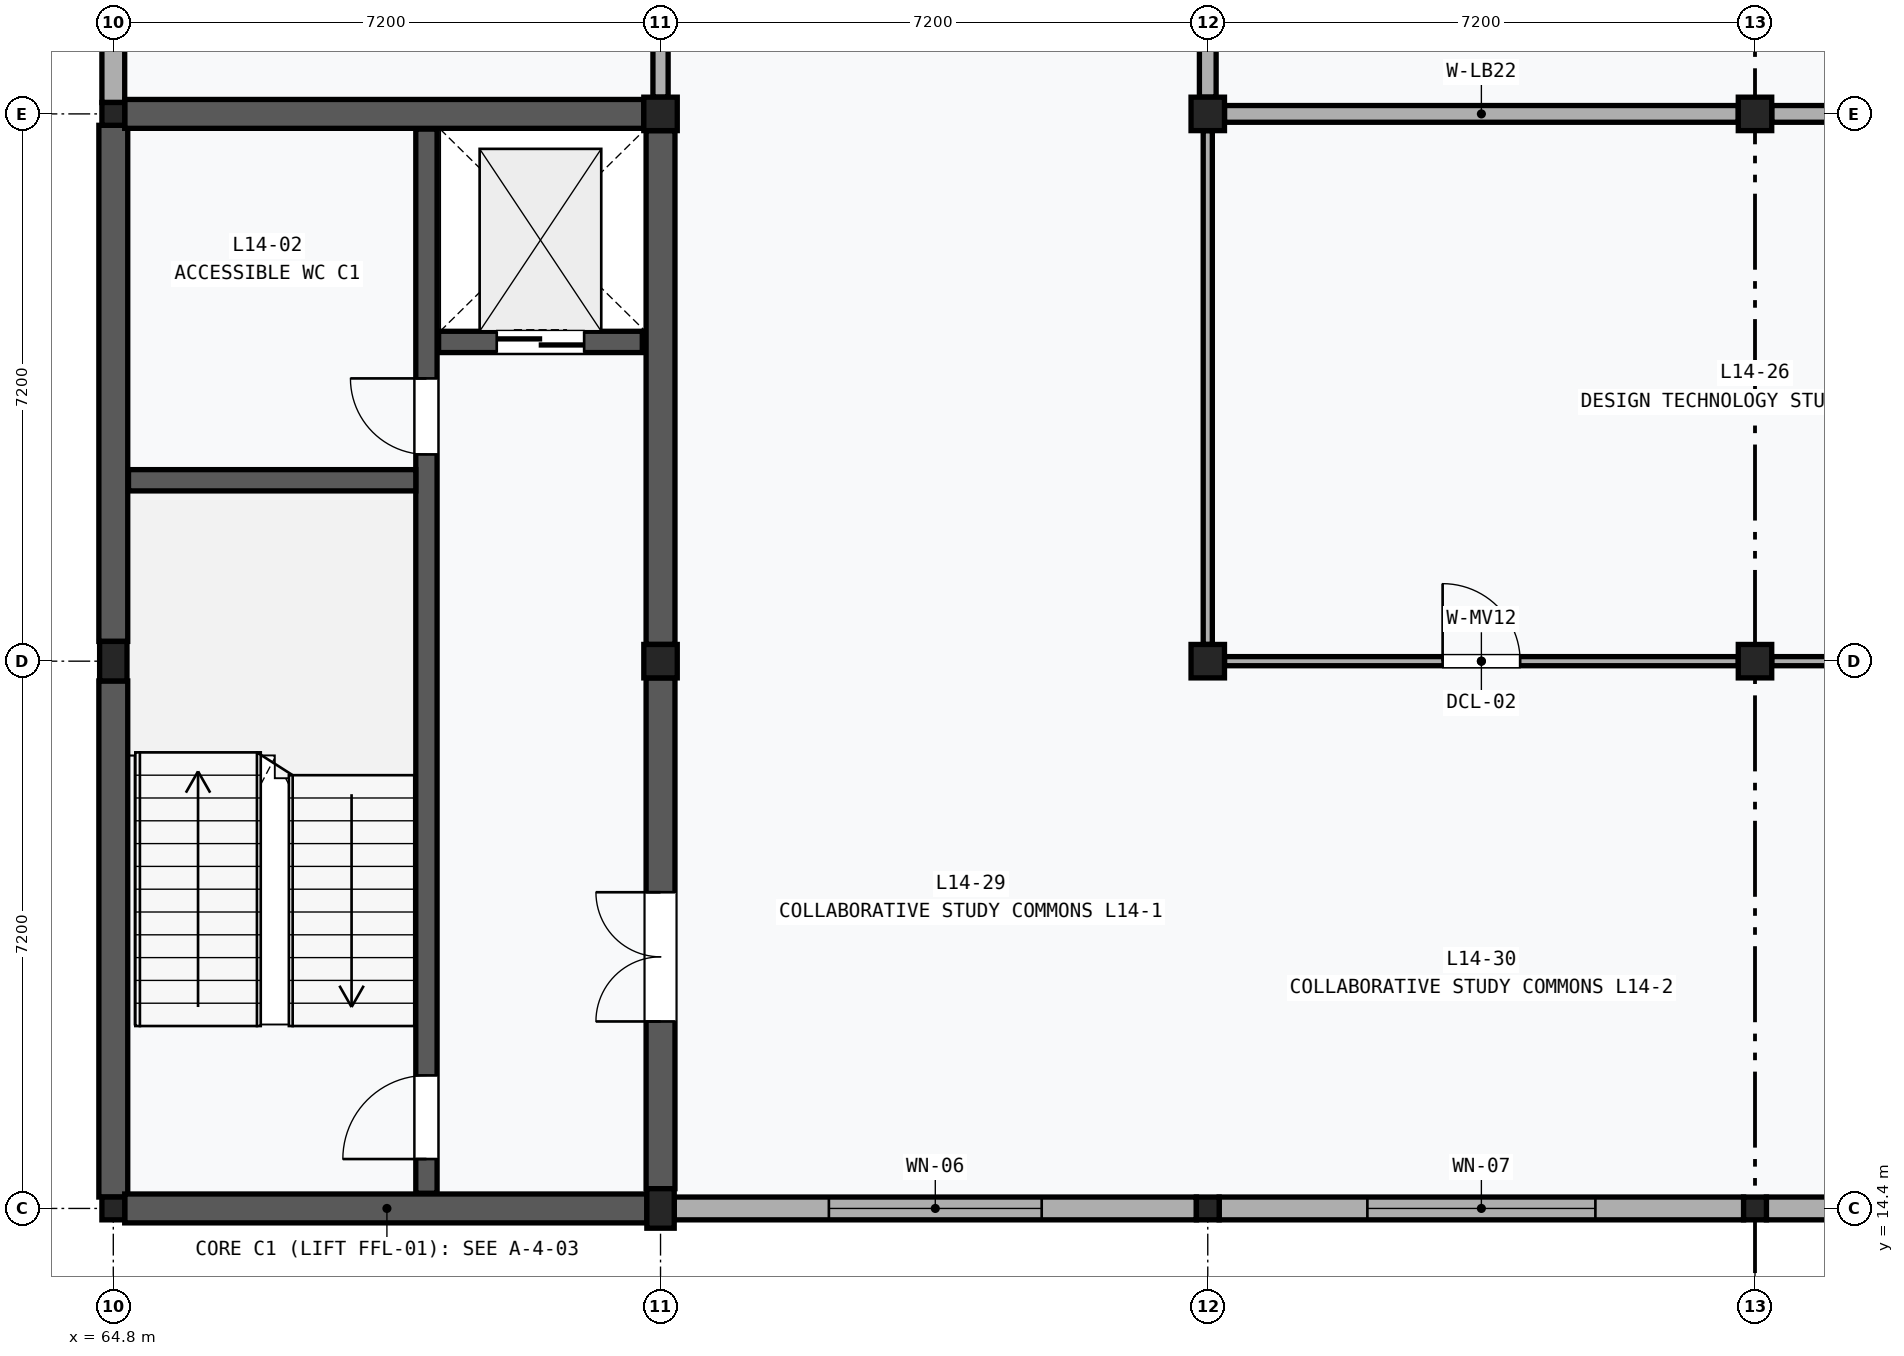
"""IFC4 building model, lengths in metres.
Left out: names, types, materials, properties, quantities, classifications, styles, units other than length and angle.
Written with IfcOpenShell. Run it as: python <this file> out.ifc"""

import sys

from ifc_helpers import new_model, si_unit, direction, frame, frame_2d, origin, origin_2d, place, context, subcontext, project, spatial, rectangle, extrude, element, fill, save


model = new_model("IFC4")
c1 = context("Model", 3, precision=1e-05, world=origin(), true_north=direction((0.0, 1.0)))
c2 = subcontext(c1, "Body", "Model", "MODEL_VIEW")
j1 = project(units=[si_unit("LENGTHUNIT", "METRE"), si_unit("PLANEANGLEUNIT", "RADIAN")], contexts=[c1])
p1 = place(None, origin())
s1 = spatial("IfcSite", under=j1, at=p1, CompositionType="ELEMENT")
p2 = place(p1, origin())
s2 = spatial("IfcBuilding", under=s1, at=p2, CompositionType="ELEMENT")
p3 = place(p2, frame((0.0, 0.0, 59.0)))
s3 = spatial("IfcBuildingStorey", under=s2, at=p3, CompositionType="ELEMENT", Elevation=59.0)
p4 = place(p3, frame((64.8, 14.4, 0.0), z_axis=(0.0, 0.0, 1.0), x_axis=(1.0, 0.0, 0.0)))
e1 = element("IfcColumn", 1, at=p4, inside=s3, PredefinedType="COLUMN", context=c2, shape_type="SweptSolid", body=[
    extrude(rectangle(XDim=0.3, YDim=0.3, at=origin_2d()), origin(), (0.0, 0.0, 1.0), 4.0),
])
p5 = place(p3, frame((64.8, 21.6, 0.0), z_axis=(0.0, 0.0, 1.0), x_axis=(1.0, 0.0, 0.0)))
e2 = element("IfcColumn", 2, at=p5, inside=s3, PredefinedType="PILASTER", context=c2, shape_type="SweptSolid", body=[
    extrude(rectangle(XDim=0.36, YDim=0.52, at=origin_2d()), origin(), (0.0, 0.0, 1.0), 4.0),
])
p6 = place(p3, frame((64.8, 28.8, 0.0), z_axis=(0.0, 0.0, 1.0), x_axis=(1.0, 0.0, 0.0)))
e3 = element("IfcColumn", 3, at=p6, inside=s3, PredefinedType="COLUMN", context=c2, shape_type="SweptSolid", body=[
    extrude(rectangle(XDim=0.3, YDim=0.3, at=origin_2d()), origin(), (0.0, 0.0, 1.0), 4.0),
])
p7 = place(p3, frame((72.0, 14.4, 0.0), z_axis=(0.0, 0.0, 1.0), x_axis=(1.0, 0.0, 0.0)))
e4 = element("IfcColumn", 4, at=p7, inside=s3, PredefinedType="PILASTER", context=c2, shape_type="SweptSolid", body=[
    extrude(rectangle(XDim=0.36, YDim=0.52, at=origin_2d()), origin(), (0.0, 0.0, 1.0), 4.0),
])
for number, where, z_axis, x_axis in (
    (5, (72.0, 21.6, 0.0), (0.0, 0.0, 1.0), (1.0, 0.0, 0.0)),
    (6, (72.0, 28.8, 0.0), (0.0, 0.0, 1.0), (1.0, 0.0, 0.0)),
):
    element("IfcColumn", number, at=place(p3, frame(where, z_axis=z_axis, x_axis=x_axis)), inside=s3, PredefinedType="COLUMN", context=c2, shape_type="SweptSolid", body=[
        extrude(rectangle(XDim=0.44, YDim=0.44, at=origin_2d()), origin(), (0.0, 0.0, 1.0), 4.0),
    ])
p8 = place(p3, frame((79.2, 14.4, 0.0), z_axis=(0.0, 0.0, 1.0), x_axis=(1.0, 0.0, 0.0)))
e7 = element("IfcColumn", 7, at=p8, inside=s3, PredefinedType="COLUMN", context=c2, shape_type="SweptSolid", body=[
    extrude(rectangle(XDim=0.3, YDim=0.3, at=origin_2d()), origin(), (0.0, 0.0, 1.0), 4.0),
])
for number, where, z_axis, x_axis in (
    (8, (79.2, 21.6, 0.0), (0.0, 0.0, 1.0), (1.0, 0.0, 0.0)),
    (9, (79.2, 28.8, 0.0), (0.0, 0.0, 1.0), (1.0, 0.0, 0.0)),
):
    element("IfcColumn", number, at=place(p3, frame(where, z_axis=z_axis, x_axis=x_axis)), inside=s3, PredefinedType="COLUMN", context=c2, shape_type="SweptSolid", body=[
        extrude(rectangle(XDim=0.44, YDim=0.44, at=origin_2d()), origin(), (0.0, 0.0, 1.0), 4.0),
    ])
p9 = place(p3, frame((86.4, 14.4, 0.0), z_axis=(0.0, 0.0, 1.0), x_axis=(1.0, 0.0, 0.0)))
e10 = element("IfcColumn", 10, at=p9, inside=s3, PredefinedType="COLUMN", context=c2, shape_type="SweptSolid", body=[
    extrude(rectangle(XDim=0.3, YDim=0.3, at=origin_2d()), origin(), (0.0, 0.0, 1.0), 4.0),
])
for number, where, z_axis, x_axis in (
    (11, (86.4, 21.6, 0.0), (0.0, 0.0, 1.0), (1.0, 0.0, 0.0)),
    (12, (86.4, 28.8, 0.0), (0.0, 0.0, 1.0), (1.0, 0.0, 0.0)),
):
    element("IfcColumn", number, at=place(p3, frame(where, z_axis=z_axis, x_axis=x_axis)), inside=s3, PredefinedType="COLUMN", context=c2, shape_type="SweptSolid", body=[
        extrude(rectangle(XDim=0.44, YDim=0.44, at=origin_2d()), origin(), (0.0, 0.0, 1.0), 4.0),
    ])
p10 = place(p3, frame((64.8, 28.95, 0.0), z_axis=(0.0, 0.0, 1.0), x_axis=(0.0, 1.0, 0.0)))
e13 = element("IfcWall", 13, at=p10, inside=s3, PredefinedType="SOLIDWALL", context=c2, shape_type="SweptSolid", body=[
    extrude(rectangle(XDim=6.9, YDim=0.3, at=frame_2d((3.45, 0.0))), origin(), (0.0, 0.0, 1.0), 3.19),
])
p11 = place(p3, frame((72.18, 14.4, 0.0), z_axis=(0.0, 0.0, 1.0), x_axis=(1.0, 0.0, 0.0)))
e14 = element("IfcWall", 14, at=p11, inside=s3, PredefinedType="SOLIDWALL", context=c2, shape_type="SweptSolid", body=[
    extrude(rectangle(XDim=6.87, YDim=0.3, at=frame_2d((3.435, 0.0))), origin(), (0.0, 0.0, 1.0), 3.19),
])
p12 = place(p11, frame((2.035, 0.0, 0.9)))
e15 = element("IfcOpeningElement", 15, at=p12, cuts=e14, PredefinedType="OPENING", context=c2, shape_type="SweptSolid", body=[
    extrude(rectangle(XDim=2.8, YDim=1.8, at=frame_2d((1.4, 0.9))), frame((0.0, 0.162, 0.0), z_axis=(0.0, -1.0, 0.0), x_axis=(1.0, 0.0, 0.0)), (0.0, 0.0, 1.0), 0.324),
])
p13 = place(p3, frame((79.35, 14.4, 0.0), z_axis=(0.0, 0.0, 1.0), x_axis=(1.0, 0.0, 0.0)))
e16 = element("IfcWall", 16, at=p13, inside=s3, PredefinedType="SOLIDWALL", context=c2, shape_type="SweptSolid", body=[
    extrude(rectangle(XDim=6.9, YDim=0.3, at=frame_2d((3.45, 0.0))), origin(), (0.0, 0.0, 1.0), 3.19),
])
p14 = place(p13, frame((1.95, 0.0, 0.9)))
e17 = element("IfcOpeningElement", 17, at=p14, cuts=e16, PredefinedType="OPENING", context=c2, shape_type="SweptSolid", body=[
    extrude(rectangle(XDim=3.0, YDim=1.8, at=frame_2d((1.5, 0.9))), frame((0.0, 0.162, 0.0), z_axis=(0.0, -1.0, 0.0), x_axis=(1.0, 0.0, 0.0)), (0.0, 0.0, 1.0), 0.324),
])
p15 = place(p3, frame((86.55, 14.4, 0.0), z_axis=(0.0, 0.0, 1.0), x_axis=(1.0, 0.0, 0.0)))
e18 = element("IfcWall", 18, at=p15, inside=s3, PredefinedType="SOLIDWALL", context=c2, shape_type="SweptSolid", body=[
    extrude(rectangle(XDim=6.9, YDim=0.3, at=frame_2d((3.45, 0.0))), origin(), (0.0, 0.0, 1.0), 3.19),
])
p16 = place(p15, frame((1.85, 0.0, 0.9)))
e19 = element("IfcOpeningElement", 19, at=p16, cuts=e18, PredefinedType="OPENING", context=c2, shape_type="SweptSolid", body=[
    extrude(rectangle(XDim=3.2, YDim=1.8, at=frame_2d((1.6, 0.9))), frame((0.0, 0.162, 0.0), z_axis=(0.0, -1.0, 0.0), x_axis=(1.0, 0.0, 0.0)), (0.0, 0.0, 1.0), 0.324),
])
p17 = place(p3, frame((64.8, 14.55, 0.0), z_axis=(0.0, 0.0, 1.0), x_axis=(0.0, 1.0, 0.0)))
e20 = element("IfcWall", 20, at=p17, inside=s3, PredefinedType="SHEAR", context=c2, shape_type="SweptSolid", body=[
    extrude(rectangle(XDim=6.79, YDim=0.38, at=frame_2d((3.395, 0.0))), origin(), (0.0, 0.0, 1.0), 3.19),
])
p18 = place(p3, frame((64.8, 21.86, 0.0), z_axis=(0.0, 0.0, 1.0), x_axis=(0.0, 1.0, 0.0)))
e21 = element("IfcWall", 21, at=p18, inside=s3, PredefinedType="SHEAR", context=c2, shape_type="SweptSolid", body=[
    extrude(rectangle(XDim=6.79, YDim=0.38, at=frame_2d((3.395, 0.0))), origin(), (0.0, 0.0, 1.0), 3.19),
])
p19 = place(p3, frame((72.0, 14.66, 0.0), z_axis=(0.0, 0.0, 1.0), x_axis=(0.0, 1.0, 0.0)))
e22 = element("IfcWall", 22, at=p19, inside=s3, PredefinedType="SHEAR", context=c2, shape_type="SweptSolid", body=[
    extrude(rectangle(XDim=6.72, YDim=0.38, at=frame_2d((3.36, 0.0))), origin(), (0.0, 0.0, 1.0), 3.11),
])
p20 = place(p19, frame((2.2, 0.0, 0.0)))
e23 = element("IfcOpeningElement", 23, at=p20, cuts=e22, PredefinedType="OPENING", context=c2, shape_type="SweptSolid", body=[
    extrude(rectangle(XDim=1.7, YDim=2.25, at=frame_2d((0.85, 1.125))), frame((0.0, 0.202, 0.0), z_axis=(0.0, -1.0, 0.0), x_axis=(1.0, 0.0, 0.0)), (0.0, 0.0, 1.0), 0.404),
])
p21 = place(p3, frame((72.0, 21.82, 0.0), z_axis=(0.0, 0.0, 1.0), x_axis=(0.0, 1.0, 0.0)))
e24 = element("IfcWall", 24, at=p21, inside=s3, PredefinedType="SHEAR", context=c2, shape_type="SweptSolid", body=[
    extrude(rectangle(XDim=6.76, YDim=0.38, at=frame_2d((3.38, 0.0))), origin(), (0.0, 0.0, 1.0), 3.11),
])
p22 = place(p3, frame((64.95, 14.4, 0.0), z_axis=(0.0, 0.0, 1.0), x_axis=(1.0, 0.0, 0.0)))
e25 = element("IfcWall", 25, at=p22, inside=s3, PredefinedType="SHEAR", context=c2, shape_type="SweptSolid", body=[
    extrude(rectangle(XDim=6.87, YDim=0.38, at=frame_2d((3.435, 0.0))), origin(), (0.0, 0.0, 1.0), 3.19),
])
p23 = place(p3, frame((64.95, 28.8, 0.0), z_axis=(0.0, 0.0, 1.0), x_axis=(1.0, 0.0, 0.0)))
e26 = element("IfcWall", 26, at=p23, inside=s3, PredefinedType="SHEAR", context=c2, shape_type="SweptSolid", body=[
    extrude(rectangle(XDim=6.83, YDim=0.38, at=frame_2d((3.415, 0.0))), origin(), (0.0, 0.0, 1.0), 3.11),
])
p24 = place(p3, frame((68.92, 14.6, 0.0), z_axis=(0.0, 0.0, 1.0), x_axis=(0.0, 1.0, 0.0)))
e27 = element("IfcWall", 27, at=p24, inside=s3, PredefinedType="SHEAR", context=c2, shape_type="SweptSolid", body=[
    extrude(rectangle(XDim=14.0, YDim=0.28, at=frame_2d((7.0, 0.0))), origin(), (0.0, 0.0, 1.0), 3.76),
])
p25 = place(p24, frame((0.45, 0.0, 0.0)))
e28 = element("IfcOpeningElement", 28, at=p25, cuts=e27, PredefinedType="OPENING", context=c2, shape_type="SweptSolid", body=[
    extrude(rectangle(XDim=1.1, YDim=2.15, at=frame_2d((0.55, 1.075))), frame((0.0, 0.152, 0.0), z_axis=(0.0, -1.0, 0.0), x_axis=(1.0, 0.0, 0.0)), (0.0, 0.0, 1.0), 0.304),
])
p26 = place(p24, frame((9.72, 0.0, 0.0)))
e29 = element("IfcOpeningElement", 29, at=p26, cuts=e27, PredefinedType="OPENING", context=c2, shape_type="SweptSolid", body=[
    extrude(rectangle(XDim=1.0, YDim=2.15, at=frame_2d((0.5, 1.075))), frame((0.0, 0.152, 0.0), z_axis=(0.0, -1.0, 0.0), x_axis=(1.0, 0.0, 0.0)), (0.0, 0.0, 1.0), 0.304),
])
p27 = place(p3, frame((65.0, 23.98, 0.0), z_axis=(0.0, 0.0, 1.0), x_axis=(1.0, 0.0, 0.0)))
e30 = element("IfcWall", 30, at=p27, inside=s3, PredefinedType="SHEAR", context=c2, shape_type="SweptSolid", body=[
    extrude(rectangle(XDim=3.78, YDim=0.28, at=frame_2d((1.89, 0.0))), origin(), (0.0, 0.0, 1.0), 3.76),
])
p28 = place(p3, frame((69.08, 25.8, 0.0), z_axis=(0.0, 0.0, 1.0), x_axis=(1.0, 0.0, 0.0)))
e31 = element("IfcWall", 31, at=p28, inside=s3, PredefinedType="SHEAR", context=c2, shape_type="SweptSolid", body=[
    extrude(rectangle(XDim=2.68, YDim=0.28, at=frame_2d((1.34, 0.0))), origin(), (0.0, 0.0, 1.0), 3.76),
])
p29 = place(p28, frame((0.765, 0.0, 0.0)))
e32 = element("IfcOpeningElement", 32, at=p29, cuts=e31, PredefinedType="OPENING", context=c2, shape_type="SweptSolid", body=[
    extrude(rectangle(XDim=1.15, YDim=2.2, at=frame_2d((0.575, 1.1))), frame((0.0, 0.152, 0.0), z_axis=(0.0, -1.0, 0.0), x_axis=(1.0, 0.0, 0.0)), (0.0, 0.0, 1.0), 0.304),
])
p30 = place(p3, frame((79.42, 28.8, 0.0), z_axis=(0.0, 0.0, 1.0), x_axis=(1.0, 0.0, 0.0)))
e33 = element("IfcWall", 33, at=p30, inside=s3, PredefinedType="PARTITIONING", context=c2, shape_type="SweptSolid", body=[
    extrude(rectangle(XDim=6.76, YDim=0.22, at=frame_2d((3.38, 0.0))), origin(), (0.0, 0.0, 1.0), 3.11),
])
p31 = place(p3, frame((79.2, 29.02, 0.0), z_axis=(0.0, 0.0, 1.0), x_axis=(0.0, 1.0, 0.0)))
e34 = element("IfcWall", 34, at=p31, inside=s3, PredefinedType="PARTITIONING", context=c2, shape_type="SweptSolid", body=[
    extrude(rectangle(XDim=6.76, YDim=0.22, at=frame_2d((3.38, 0.0))), origin(), (0.0, 0.0, 1.0), 3.11),
])
p32 = place(p31, frame((2.8, 0.0, 0.0)))
e35 = element("IfcOpeningElement", 35, at=p32, cuts=e34, PredefinedType="OPENING", context=c2, shape_type="SweptSolid", body=[
    extrude(rectangle(XDim=1.16, YDim=2.22, at=frame_2d((0.58, 1.11))), frame((0.0, 0.122, 0.0), z_axis=(0.0, -1.0, 0.0), x_axis=(1.0, 0.0, 0.0)), (0.0, 0.0, 1.0), 0.244),
])
p33 = place(p3, frame((86.62, 28.8, 0.0), z_axis=(0.0, 0.0, 1.0), x_axis=(1.0, 0.0, 0.0)))
e36 = element("IfcWall", 36, at=p33, inside=s3, PredefinedType="PARTITIONING", context=c2, shape_type="SweptSolid", body=[
    extrude(rectangle(XDim=6.76, YDim=0.22, at=frame_2d((3.38, 0.0))), origin(), (0.0, 0.0, 1.0), 3.11),
])
p34 = place(p3, frame((72.0, 29.02, 0.0), z_axis=(0.0, 0.0, 1.0), x_axis=(0.0, 1.0, 0.0)))
e37 = element("IfcWall", 37, at=p34, inside=s3, PredefinedType="PARTITIONING", context=c2, shape_type="SweptSolid", body=[
    extrude(rectangle(XDim=6.76, YDim=0.2, at=frame_2d((3.38, 0.0))), origin(), (0.0, 0.0, 1.0), 3.11),
])
p35 = place(p34, frame((2.88, 0.0, 0.0)))
e38 = element("IfcOpeningElement", 38, at=p35, cuts=e37, PredefinedType="OPENING", context=c2, shape_type="SweptSolid", body=[
    extrude(rectangle(XDim=1.0, YDim=2.1, at=frame_2d((0.5, 1.05))), frame((0.0, 0.112, 0.0), z_axis=(0.0, -1.0, 0.0), x_axis=(1.0, 0.0, 0.0)), (0.0, 0.0, 1.0), 0.224),
])
p36 = place(p3, frame((79.42, 21.6, 0.0), z_axis=(0.0, 0.0, 1.0), x_axis=(1.0, 0.0, 0.0)))
e39 = element("IfcWall", 39, at=p36, inside=s3, PredefinedType="MOVABLE", context=c2, shape_type="SweptSolid", body=[
    extrude(rectangle(XDim=6.76, YDim=0.12, at=frame_2d((3.38, 0.0))), origin(), (0.0, 0.0, 1.0), 3.11),
])
p37 = place(p36, frame((2.87, 0.0, 0.0)))
e40 = element("IfcOpeningElement", 40, at=p37, cuts=e39, PredefinedType="OPENING", context=c2, shape_type="SweptSolid", body=[
    extrude(rectangle(XDim=1.02, YDim=2.12, at=frame_2d((0.51, 1.06))), frame((0.0, 0.072, 0.0), z_axis=(0.0, -1.0, 0.0), x_axis=(1.0, 0.0, 0.0)), (0.0, 0.0, 1.0), 0.144),
])
p38 = place(p3, frame((79.2, 21.82, 0.0), z_axis=(0.0, 0.0, 1.0), x_axis=(0.0, 1.0, 0.0)))
e41 = element("IfcWall", 41, at=p38, inside=s3, PredefinedType="MOVABLE", context=c2, shape_type="SweptSolid", body=[
    extrude(rectangle(XDim=6.76, YDim=0.12, at=frame_2d((3.38, 0.0))), origin(), (0.0, 0.0, 1.0), 3.11),
])
p39 = place(p3, frame((86.62, 21.6, 0.0), z_axis=(0.0, 0.0, 1.0), x_axis=(1.0, 0.0, 0.0)))
e42 = element("IfcWall", 42, at=p39, inside=s3, PredefinedType="MOVABLE", context=c2, shape_type="SweptSolid", body=[
    extrude(rectangle(XDim=6.76, YDim=0.12, at=frame_2d((3.38, 0.0))), origin(), (0.0, 0.0, 1.0), 3.11),
])
p40 = place(p12, origin())
e43 = element("IfcWindow", 43, at=p40, inside=s3, PartitioningType="SINGLE_PANEL", PredefinedType="WINDOW", context=c2, shape_type="SweptSolid", body=[
    extrude(rectangle(XDim=2.8, YDim=1.8, at=frame_2d((1.4, 0.9))), frame((0.0, 0.03, 0.0), z_axis=(0.0, -1.0, 0.0), x_axis=(1.0, 0.0, 0.0)), (0.0, 0.0, 1.0), 0.06),
])
fill(e15, e43)
p41 = place(p14, origin())
e44 = element("IfcWindow", 44, at=p41, inside=s3, PartitioningType="SINGLE_PANEL", PredefinedType="WINDOW", context=c2, shape_type="SweptSolid", body=[
    extrude(rectangle(XDim=3.0, YDim=1.8, at=frame_2d((1.5, 0.9))), frame((0.0, 0.03, 0.0), z_axis=(0.0, -1.0, 0.0), x_axis=(1.0, 0.0, 0.0)), (0.0, 0.0, 1.0), 0.06),
])
fill(e17, e44)
p42 = place(p20, origin())
e45 = element("IfcDoor", 45, at=p42, inside=s3, OperationType="DOUBLE_DOOR_SINGLE_SWING", PredefinedType="DOOR", context=c2, shape_type="SweptSolid", body=[
    extrude(rectangle(XDim=1.7, YDim=2.25, at=frame_2d((0.85, 1.125))), frame((0.0, 0.025, 0.0), z_axis=(0.0, -1.0, 0.0), x_axis=(1.0, 0.0, 0.0)), (0.0, 0.0, 1.0), 0.05),
])
fill(e23, e45)
p43 = place(p25, origin())
e46 = element("IfcDoor", 46, at=p43, inside=s3, OperationType="SINGLE_SWING_LEFT", PredefinedType="DOOR", context=c2, shape_type="SweptSolid", body=[
    extrude(rectangle(XDim=1.1, YDim=2.15, at=frame_2d((0.55, 1.075))), frame((0.0, 0.025, 0.0), z_axis=(0.0, -1.0, 0.0), x_axis=(1.0, 0.0, 0.0)), (0.0, 0.0, 1.0), 0.05),
])
fill(e28, e46)
p44 = place(p26, origin())
e47 = element("IfcDoor", 47, at=p44, inside=s3, OperationType="SINGLE_SWING_RIGHT", PredefinedType="DOOR", context=c2, shape_type="SweptSolid", body=[
    extrude(rectangle(XDim=1.0, YDim=2.15, at=frame_2d((0.5, 1.075))), frame((0.0, 0.025, 0.0), z_axis=(0.0, -1.0, 0.0), x_axis=(1.0, 0.0, 0.0)), (0.0, 0.0, 1.0), 0.05),
])
fill(e29, e47)
p45 = place(p29, frame((1.15, 0.0, 0.0), z_axis=(0.0, 0.0, 1.0), x_axis=(-1.0, 0.0, 0.0)))
e48 = element("IfcDoor", 48, at=p45, inside=s3, OperationType="DOUBLE_DOOR_SLIDING", PredefinedType="DOOR", context=c2, shape_type="SweptSolid", body=[
    extrude(rectangle(XDim=1.15, YDim=2.2, at=frame_2d((0.575, 1.1))), frame((0.0, 0.025, 0.0), z_axis=(0.0, -1.0, 0.0), x_axis=(1.0, 0.0, 0.0)), (0.0, 0.0, 1.0), 0.05),
])
fill(e32, e48)
p46 = place(p37, origin())
e49 = element("IfcDoor", 49, at=p46, inside=s3, OperationType="SINGLE_SWING_LEFT", PredefinedType="DOOR", context=c2, shape_type="SweptSolid", body=[
    extrude(rectangle(XDim=1.02, YDim=2.12, at=frame_2d((0.51, 1.06))), frame((0.0, 0.025, 0.0), z_axis=(0.0, -1.0, 0.0), x_axis=(1.0, 0.0, 0.0)), (0.0, 0.0, 1.0), 0.05),
])
fill(e40, e49)
save(model, sys.argv[1])
